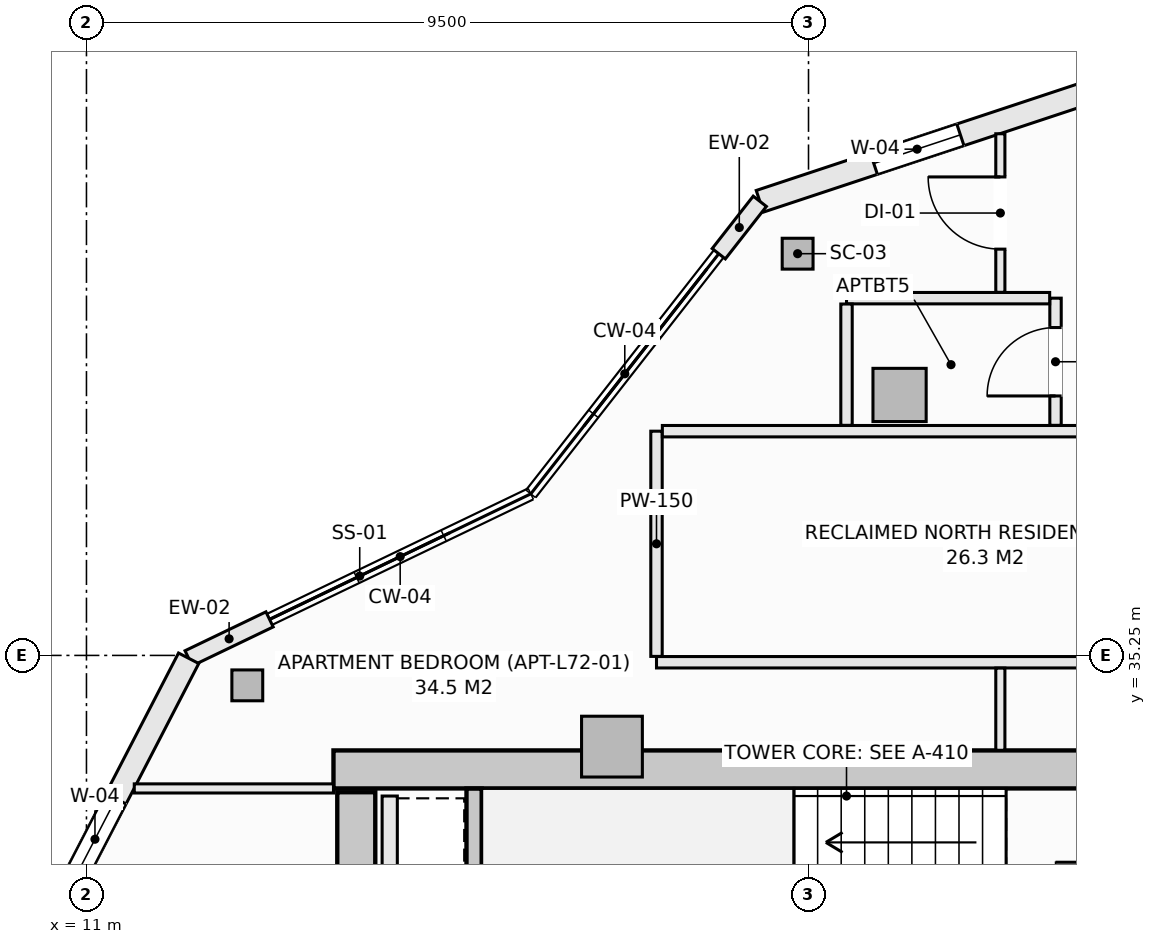
"""IFC4 building model, lengths in metres.
Left out: names, types, materials, properties, quantities, classifications, styles, units other than length and angle.
Written with IfcOpenShell. Run it as: python <this file> out.ifc"""

import sys

from ifc_helpers import new_model, si_unit, direction, frame, frame_2d, origin, origin_2d, place, context, subcontext, project, spatial, rectangle, hollow_rectangle, extrude, element, fill, save


model = new_model("IFC4")
c1 = context("Model", 3, precision=1e-05, world=origin(), true_north=direction((0.0, 1.0)))
c2 = subcontext(c1, "Body", "Model", "MODEL_VIEW")
j1 = project(units=[si_unit("LENGTHUNIT", "METRE"), si_unit("PLANEANGLEUNIT", "RADIAN")], contexts=[c1])
p1 = place(None, origin())
s1 = spatial("IfcSite", under=j1, at=p1, CompositionType="ELEMENT")
p2 = place(p1, origin())
s2 = spatial("IfcBuilding", under=s1, at=p2, CompositionType="ELEMENT")
p3 = place(p2, frame((0.0, 0.0, 265.7)))
s3 = spatial("IfcBuildingStorey", under=s2, at=p3, CompositionType="ELEMENT", Elevation=265.7)
p4 = place(p3, frame((14.25, 33.75, -0.27), z_axis=(0.0, 0.0, 1.0), x_axis=(1.0, 0.0, 0.0)))
e1 = element("IfcWall", 1, at=p4, inside=s3, PredefinedType="SHEAR", context=c2, shape_type="SweptSolid", body=[
    extrude(rectangle(XDim=13.5, YDim=0.5, at=frame_2d((6.75, 0.0))), origin(), (0.0, 0.0, 1.0), 3.3),
])
p5 = place(p3, frame((14.55, 20.55, -0.27), z_axis=(0.0, 0.0, 1.0), x_axis=(0.0, 1.0, 0.0)))
e2 = element("IfcWall", 2, at=p5, inside=s3, PredefinedType="SHEAR", context=c2, shape_type="SweptSolid", body=[
    extrude(rectangle(XDim=12.9, YDim=0.5, at=frame_2d((6.45, 0.0))), origin(), (0.0, 0.0, 1.0), 3.3),
])
for number, where, z_axis, x_axis in (
    (3, (20.357, 40.535, -0.27), (0.0, 0.0, 1.0), (1.0, 0.0, 0.0)),
    (4, (13.116, 34.856, -0.27), (0.0, 0.0, 1.0), (1.0, 0.0, 0.0)),
):
    element("IfcColumn", number, at=place(p3, frame(where, z_axis=z_axis, x_axis=x_axis)), inside=s3, PredefinedType="COLUMN", context=c2, shape_type="SweptSolid", body=[
        extrude(hollow_rectangle(XDim=0.406, YDim=0.406, WallThickness=0.016, at=origin_2d()), origin(), (0.0, 0.0, 1.0), 3.3),
    ])
p6 = place(p3, frame((21.698, 38.677, -0.27), z_axis=(0.0, 0.0, 1.0), x_axis=(1.0, 0.0, 0.0)))
e5 = element("IfcColumn", 5, at=p6, inside=s3, PredefinedType="COLUMN", context=c2, shape_type="SweptSolid", body=[
    extrude(rectangle(XDim=0.7, YDim=0.7, at=origin_2d()), origin(), (0.0, 0.0, 1.0), 3.3),
])
p7 = place(p3, frame((17.914, 34.05, -0.27), z_axis=(0.0, 0.0, 1.0), x_axis=(1.0, 0.0, 0.0)))
e6 = element("IfcColumn", 6, at=p7, inside=s3, PredefinedType="PILASTER", context=c2, shape_type="SweptSolid", body=[
    extrude(rectangle(XDim=0.8, YDim=0.8, at=origin_2d()), origin(), (0.0, 0.0, 1.0), 3.3),
])
p8 = place(p3, frame((19.859, 41.225, 0.0), z_axis=(0.0, 0.0, 1.0), x_axis=(0.949252744709, 0.314514271001, 0.0)))
e7 = element("IfcWall", 7, at=p8, inside=s3, PredefinedType="SOLIDWALL", context=c2, shape_type="SweptSolid", body=[
    extrude(rectangle(XDim=5.216, YDim=0.3, at=frame_2d((2.608, 0.0))), origin(), (0.0, 0.0, 1.0), 2.605),
])
p9 = place(p8, frame((1.58, 0.0, 0.72)))
e8 = element("IfcOpeningElement", 8, at=p9, cuts=e7, PredefinedType="OPENING", context=c2, shape_type="SweptSolid", body=[
    extrude(rectangle(XDim=1.2, YDim=1.65, at=frame_2d((0.6, 0.825))), frame((0.0, 0.16, 0.0), z_axis=(0.0, -1.0, 0.0), x_axis=(1.0, 0.0, 0.0)), (0.0, 0.0, 1.0), 0.32),
])
p10 = place(p3, frame((19.319, 40.534, 0.0), z_axis=(0.0, 0.0, 1.0), x_axis=(0.61640589237, 0.787428584604, 0.0)))
e9 = element("IfcWall", 9, at=p10, inside=s3, PredefinedType="SOLIDWALL", context=c2, shape_type="SweptSolid", body=[
    extrude(rectangle(XDim=0.876, YDim=0.22, at=frame_2d((0.438, 0.0))), origin(), (0.0, 0.0, 1.0), 2.605),
])
p11 = place(p3, frame((12.344, 35.212, 0.0), z_axis=(0.0, 0.0, 1.0), x_axis=(0.901264843027, 0.433268603437, 0.0)))
e10 = element("IfcWall", 10, at=p11, inside=s3, PredefinedType="SOLIDWALL", context=c2, shape_type="SweptSolid", body=[
    extrude(rectangle(XDim=1.181, YDim=0.22, at=frame_2d((0.591, 0.0))), origin(), (0.0, 0.0, 1.0), 2.605),
])
p12 = place(p3, frame((10.293, 31.251, 0.0), z_axis=(0.0, 0.0, 1.0), x_axis=(0.459801070243, 0.888021945564, 0.0)))
e11 = element("IfcWall", 11, at=p12, inside=s3, PredefinedType="SOLIDWALL", context=c2, shape_type="SweptSolid", body=[
    extrude(rectangle(XDim=4.461, YDim=0.3, at=frame_2d((2.23, 0.0))), origin(), (0.0, 0.0, 1.0), 2.605),
])
p13 = place(p12, frame((1.18, 0.0, 0.72)))
e12 = element("IfcOpeningElement", 12, at=p13, cuts=e11, PredefinedType="OPENING", context=c2, shape_type="SweptSolid", body=[
    extrude(rectangle(XDim=1.2, YDim=1.65, at=frame_2d((0.6, 0.825))), frame((0.0, 0.16, 0.0), z_axis=(0.0, -1.0, 0.0), x_axis=(1.0, 0.0, 0.0)), (0.0, 0.0, 1.0), 0.32),
])
p14 = place(p3, frame((16.1, 30.462, -0.27), z_axis=(0.0, 0.0, 1.0), x_axis=(0.0, 1.0, 0.0)))
e13 = element("IfcWall", 13, at=p14, inside=s3, PredefinedType="SHEAR", context=c2, shape_type="SweptSolid", body=[
    extrude(rectangle(XDim=3.036, YDim=0.2, at=frame_2d((1.518, 0.0))), origin(), (0.0, 0.0, 1.0), 3.3),
])
p15 = place(p3, frame((14.99, 30.55, 0.0), z_axis=(0.0, 0.0, 1.0), x_axis=(0.0, 1.0, 0.0)))
e14 = element("IfcWall", 14, at=p15, inside=s3, PredefinedType="SOLIDWALL", context=c2, shape_type="SweptSolid", body=[
    extrude(rectangle(XDim=2.85, YDim=0.2, at=frame_2d((1.425, 0.0))), origin(), (0.0, 0.0, 1.0), 3.03),
])
p16 = place(p3, frame((18.5, 35.16, 0.0), z_axis=(0.0, 0.0, 1.0), x_axis=(1.0, 0.0, 0.0)))
e15 = element("IfcWall", 15, at=p16, inside=s3, PredefinedType="PARTITIONING", context=c2, shape_type="SweptSolid", body=[
    extrude(rectangle(XDim=8.573, YDim=0.15, at=frame_2d((4.287, 0.0))), origin(), (0.0, 0.0, 1.0), 3.03),
])
p17 = place(p3, frame((18.5, 35.237, 0.0), z_axis=(0.0, 0.0, 1.0), x_axis=(0.0, 1.0, 0.0)))
e16 = element("IfcWall", 16, at=p17, inside=s3, PredefinedType="PARTITIONING", context=c2, shape_type="SweptSolid", body=[
    extrude(rectangle(XDim=2.963, YDim=0.15, at=frame_2d((1.481, 0.0))), origin(), (0.0, 0.0, 1.0), 3.03),
])
p18 = place(p3, frame((18.577, 38.2, 0.0), z_axis=(0.0, 0.0, 1.0), x_axis=(1.0, 0.0, 0.0)))
e17 = element("IfcWall", 17, at=p18, inside=s3, PredefinedType="PARTITIONING", context=c2, shape_type="SweptSolid", body=[
    extrude(rectangle(XDim=8.496, YDim=0.15, at=frame_2d((4.248, 0.0))), origin(), (0.0, 0.0, 1.0), 3.03),
])
p19 = place(p3, frame((11.629, 33.5, 0.0), z_axis=(0.0, 0.0, 1.0), x_axis=(1.0, 0.0, 0.0)))
e18 = element("IfcWall", 18, at=p19, inside=s3, PredefinedType="PARTITIONING", context=c2, shape_type="SweptSolid", body=[
    extrude(rectangle(XDim=2.621, YDim=0.12, at=frame_2d((1.311, 0.0))), origin(), (0.0, 0.0, 1.0), 3.03),
])
p20 = place(p3, frame((23.75, 38.277, 0.0), z_axis=(0.0, 0.0, 1.0), x_axis=(0.0, 1.0, 0.0)))
e19 = element("IfcWall", 19, at=p20, inside=s3, PredefinedType="PARTITIONING", context=c2, shape_type="SweptSolid", body=[
    extrude(rectangle(XDim=1.673, YDim=0.15, at=frame_2d((0.836, 0.0))), origin(), (0.0, 0.0, 1.0), 3.03),
])
p21 = place(p20, frame((0.386, 0.0, 0.0)))
e20 = element("IfcOpeningElement", 20, at=p21, cuts=e19, PredefinedType="OPENING", context=c2, shape_type="SweptSolid", body=[
    extrude(rectangle(XDim=0.9, YDim=2.1, at=frame_2d((0.45, 1.05))), frame((0.0, 0.085, 0.0), z_axis=(0.0, -1.0, 0.0), x_axis=(1.0, 0.0, 0.0)), (0.0, 0.0, 1.0), 0.17),
])
p22 = place(p3, frame((21.0, 39.95, 0.0), z_axis=(0.0, 0.0, 1.0), x_axis=(1.0, 0.0, 0.0)))
e21 = element("IfcWall", 21, at=p22, inside=s3, PredefinedType="PARTITIONING", context=c2, shape_type="SweptSolid", body=[
    extrude(rectangle(XDim=2.673, YDim=0.15, at=frame_2d((1.336, 0.0))), origin(), (0.0, 0.0, 1.0), 3.03),
])
p23 = place(p3, frame((23.024, 34.002, 0.0), z_axis=(0.0, 0.0, 1.0), x_axis=(0.0, 1.0, 0.0)))
e22 = element("IfcWall", 22, at=p23, inside=s3, PredefinedType="PARTITIONING", context=c2, shape_type="SweptSolid", body=[
    extrude(rectangle(XDim=1.081, YDim=0.12, at=frame_2d((0.541, 0.0))), origin(), (0.0, 0.0, 1.0), 3.03),
])
p24 = place(p3, frame((23.024, 40.027, 0.0), z_axis=(0.0, 0.0, 1.0), x_axis=(0.0, 1.0, 0.0)))
e23 = element("IfcWall", 23, at=p24, inside=s3, PredefinedType="PARTITIONING", context=c2, shape_type="SweptSolid", body=[
    extrude(rectangle(XDim=2.086, YDim=0.12, at=frame_2d((1.043, 0.0))), origin(), (0.0, 0.0, 1.0), 3.03),
])
p25 = place(p24, frame((0.568, 0.0, 0.0)))
e24 = element("IfcOpeningElement", 24, at=p25, cuts=e23, PredefinedType="OPENING", context=c2, shape_type="SweptSolid", body=[
    extrude(rectangle(XDim=0.95, YDim=2.1, at=frame_2d((0.475, 1.05))), frame((0.0, 0.07, 0.0), z_axis=(0.0, -1.0, 0.0), x_axis=(1.0, 0.0, 0.0)), (0.0, 0.0, 1.0), 0.14),
])
p26 = place(p3, frame((21.0, 38.277, 0.0), z_axis=(0.0, 0.0, 1.0), x_axis=(0.0, 1.0, 0.0)))
e25 = element("IfcWall", 25, at=p26, inside=s3, PredefinedType="PARTITIONING", context=c2, shape_type="SweptSolid", body=[
    extrude(rectangle(XDim=1.596, YDim=0.15, at=frame_2d((0.798, 0.0))), origin(), (0.0, 0.0, 1.0), 2.478),
])
p27 = place(p9, origin())
e26 = element("IfcWindow", 26, at=p27, inside=s3, PartitioningType="SINGLE_PANEL", PredefinedType="WINDOW", context=c2, shape_type="SweptSolid", body=[
    extrude(rectangle(XDim=1.2, YDim=1.65, at=frame_2d((0.6, 0.825))), frame((0.0, 0.03, 0.0), z_axis=(0.0, -1.0, 0.0), x_axis=(1.0, 0.0, 0.0)), (0.0, 0.0, 1.0), 0.06),
])
fill(e8, e26)
p28 = place(p13, origin())
e27 = element("IfcWindow", 27, at=p28, inside=s3, PartitioningType="SINGLE_PANEL", PredefinedType="WINDOW", context=c2, shape_type="SweptSolid", body=[
    extrude(rectangle(XDim=1.2, YDim=1.65, at=frame_2d((0.6, 0.825))), frame((0.0, 0.03, 0.0), z_axis=(0.0, -1.0, 0.0), x_axis=(1.0, 0.0, 0.0)), (0.0, 0.0, 1.0), 0.06),
])
fill(e12, e27)
p29 = place(p21, origin())
e28 = element("IfcDoor", 28, at=p29, inside=s3, OperationType="SINGLE_SWING_LEFT", PredefinedType="DOOR", context=c2, shape_type="SweptSolid", body=[
    extrude(rectangle(XDim=0.9, YDim=2.1, at=frame_2d((0.45, 1.05))), frame((0.0, 0.025, 0.0), z_axis=(0.0, -1.0, 0.0), x_axis=(1.0, 0.0, 0.0)), (0.0, 0.0, 1.0), 0.05),
])
fill(e20, e28)
p30 = place(p25, origin())
e29 = element("IfcDoor", 29, at=p30, inside=s3, OperationType="SINGLE_SWING_RIGHT", PredefinedType="DOOR", context=c2, shape_type="SweptSolid", body=[
    extrude(rectangle(XDim=0.95, YDim=2.1, at=frame_2d((0.475, 1.05))), frame((0.0, 0.025, 0.0), z_axis=(0.0, -1.0, 0.0), x_axis=(1.0, 0.0, 0.0)), (0.0, 0.0, 1.0), 0.05),
])
fill(e24, e29)
save(model, sys.argv[1])
